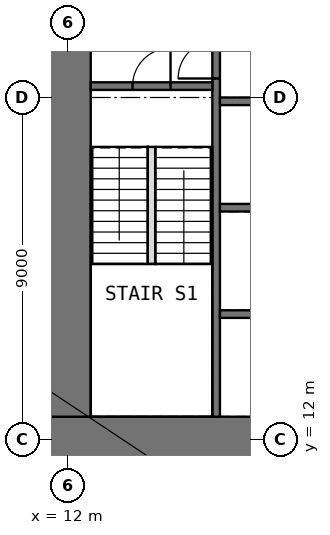
"""IFC4 building model, lengths in metres.
Left out: names, types, materials, properties, quantities, classifications, styles, units other than length and angle.
Written with IfcOpenShell. Run it as: python <this file> out.ifc"""

import sys

from ifc_helpers import new_model, si_unit, direction, frame, frame_2d, origin, place, context, subcontext, project, spatial, rectangle, extrude, element, fill, save


model = new_model("IFC4")
c1 = context("Model", 3, precision=1e-05, world=origin(), true_north=direction((0.0, 1.0)))
c2 = subcontext(c1, "Body", "Model", "MODEL_VIEW")
j1 = project(units=[si_unit("LENGTHUNIT", "METRE"), si_unit("PLANEANGLEUNIT", "RADIAN")], contexts=[c1])
p1 = place(None, origin())
s1 = spatial("IfcSite", under=j1, at=p1, CompositionType="ELEMENT")
p2 = place(p1, origin())
s2 = spatial("IfcBuilding", under=s1, at=p2, CompositionType="ELEMENT")
p3 = place(p2, frame((0.0, 0.0, 62.5)))
s3 = spatial("IfcBuildingStorey", under=s2, at=p3, CompositionType="ELEMENT", Elevation=62.5)
p4 = place(p3, frame((10.8, 11.7, -0.05), z_axis=(0.0, 0.0, 1.0), x_axis=(1.0, 0.0, 0.0)))
e1 = element("IfcWall", 1, at=p4, inside=s3, PredefinedType="SHEAR", context=c2, shape_type="SweptSolid", body=[
    extrude(rectangle(XDim=20.4, YDim=1.8, at=frame_2d((10.2, 0.0))), origin(), (0.0, 0.0, 1.0), 4.0),
])
p5 = place(p4, frame((9.2, 0.0, 0.05)))
e2 = element("IfcOpeningElement", 2, at=p5, cuts=e1, PredefinedType="OPENING", context=c2, shape_type="SweptSolid", body=[
    extrude(rectangle(XDim=2.0, YDim=2.2, at=frame_2d((1.0, 1.1))), frame((0.0, 0.91, 0.0), z_axis=(0.0, -1.0, 0.0), x_axis=(1.0, 0.0, 0.0)), (0.0, 0.0, 1.0), 1.82),
])
p6 = place(p3, frame((11.7, 12.6, -0.05), z_axis=(0.0, 0.0, 1.0), x_axis=(0.0, 1.0, 0.0)))
e3 = element("IfcWall", 3, at=p6, inside=s3, PredefinedType="SHEAR", context=c2, shape_type="SweptSolid", body=[
    extrude(rectangle(XDim=16.8, YDim=1.8, at=frame_2d((8.4, 0.0))), origin(), (0.0, 0.0, 1.0), 4.0),
])
p7 = place(p6, frame((9.9, 0.0, 0.05)))
e4 = element("IfcOpeningElement", 4, at=p7, cuts=e3, PredefinedType="OPENING", context=c2, shape_type="SweptSolid", body=[
    extrude(rectangle(XDim=1.0, YDim=2.2, at=frame_2d((0.5, 1.1))), frame((0.0, 0.91, 0.0), z_axis=(0.0, -1.0, 0.0), x_axis=(1.0, 0.0, 0.0)), (0.0, 0.0, 1.0), 1.82),
])
p8 = place(p3, frame((15.9, 12.6, -0.05), z_axis=(0.0, 0.0, 1.0), x_axis=(0.0, 1.0, 0.0)))
e5 = element("IfcWall", 5, at=p8, inside=s3, PredefinedType="SHEAR", context=c2, shape_type="SweptSolid", body=[
    extrude(rectangle(XDim=16.8, YDim=0.2, at=frame_2d((8.4, 0.0))), origin(), (0.0, 0.0, 1.0), 4.0),
])
p9 = place(p8, frame((8.9, 0.0, 0.05)))
e6 = element("IfcOpeningElement", 6, at=p9, cuts=e5, PredefinedType="OPENING", context=c2, shape_type="SweptSolid", body=[
    extrude(rectangle(XDim=1.0, YDim=2.2, at=frame_2d((0.5, 1.1))), frame((0.0, 0.11, 0.0), z_axis=(0.0, -1.0, 0.0), x_axis=(1.0, 0.0, 0.0)), (0.0, 0.0, 1.0), 0.22),
])
p10 = place(p3, frame((12.6, 21.3, -0.05), z_axis=(0.0, 0.0, 1.0), x_axis=(1.0, 0.0, 0.0)))
e7 = element("IfcWall", 7, at=p10, inside=s3, PredefinedType="SHEAR", context=c2, shape_type="SweptSolid", body=[
    extrude(rectangle(XDim=3.2, YDim=0.2, at=frame_2d((1.6, 0.0))), origin(), (0.0, 0.0, 1.0), 4.0),
])
p11 = place(p10, frame((1.1, 0.0, 0.05)))
e8 = element("IfcOpeningElement", 8, at=p11, cuts=e7, PredefinedType="OPENING", context=c2, shape_type="SweptSolid", body=[
    extrude(rectangle(XDim=1.0, YDim=2.2, at=frame_2d((0.5, 1.1))), frame((0.0, 0.11, 0.0), z_axis=(0.0, -1.0, 0.0), x_axis=(1.0, 0.0, 0.0)), (0.0, 0.0, 1.0), 0.22),
])
for number, where, z_axis, x_axis in (
    (9, (16.0, 15.3, -0.05), (0.0, 0.0, 1.0), (1.0, 0.0, 0.0)),
    (10, (16.0, 18.1, -0.05), (0.0, 0.0, 1.0), (1.0, 0.0, 0.0)),
    (11, (16.0, 20.9, -0.05), (0.0, 0.0, 1.0), (1.0, 0.0, 0.0)),
):
    element("IfcWall", number, at=place(p3, frame(where, z_axis=z_axis, x_axis=x_axis)), inside=s3, PredefinedType="SHEAR", context=c2, shape_type="SweptSolid", body=[
        extrude(rectangle(XDim=3.2, YDim=0.2, at=frame_2d((1.6, 0.0))), origin(), (0.0, 0.0, 1.0), 4.0),
    ])
p12 = place(p3, frame((14.2, 16.62, 0.0), z_axis=(0.0, 0.0, 1.0), x_axis=(0.0, 1.0, 0.0)))
e12 = element("IfcWall", 12, at=p12, inside=s3, PredefinedType="PARTITIONING", context=c2, shape_type="SweptSolid", body=[
    extrude(rectangle(XDim=3.08, YDim=0.2, at=frame_2d((1.54, 0.0))), origin(), (0.0, 0.0, 1.0), 4.0),
])
p13 = place(p11, origin())
e13 = element("IfcDoor", 13, at=p13, inside=s3, OperationType="SINGLE_SWING_RIGHT", PredefinedType="DOOR", context=c2, shape_type="SweptSolid", body=[
    extrude(rectangle(XDim=1.0, YDim=2.2, at=frame_2d((0.5, 1.1))), frame((0.0, 0.025, 0.0), z_axis=(0.0, -1.0, 0.0), x_axis=(1.0, 0.0, 0.0)), (0.0, 0.0, 1.0), 0.05),
])
fill(e8, e13)
p14 = place(p9, origin())
e14 = element("IfcDoor", 14, at=p14, inside=s3, OperationType="SINGLE_SWING_LEFT", PredefinedType="DOOR", context=c2, shape_type="SweptSolid", body=[
    extrude(rectangle(XDim=1.0, YDim=2.2, at=frame_2d((0.5, 1.1))), frame((0.0, 0.025, 0.0), z_axis=(0.0, -1.0, 0.0), x_axis=(1.0, 0.0, 0.0)), (0.0, 0.0, 1.0), 0.05),
])
fill(e6, e14)
save(model, sys.argv[1])
